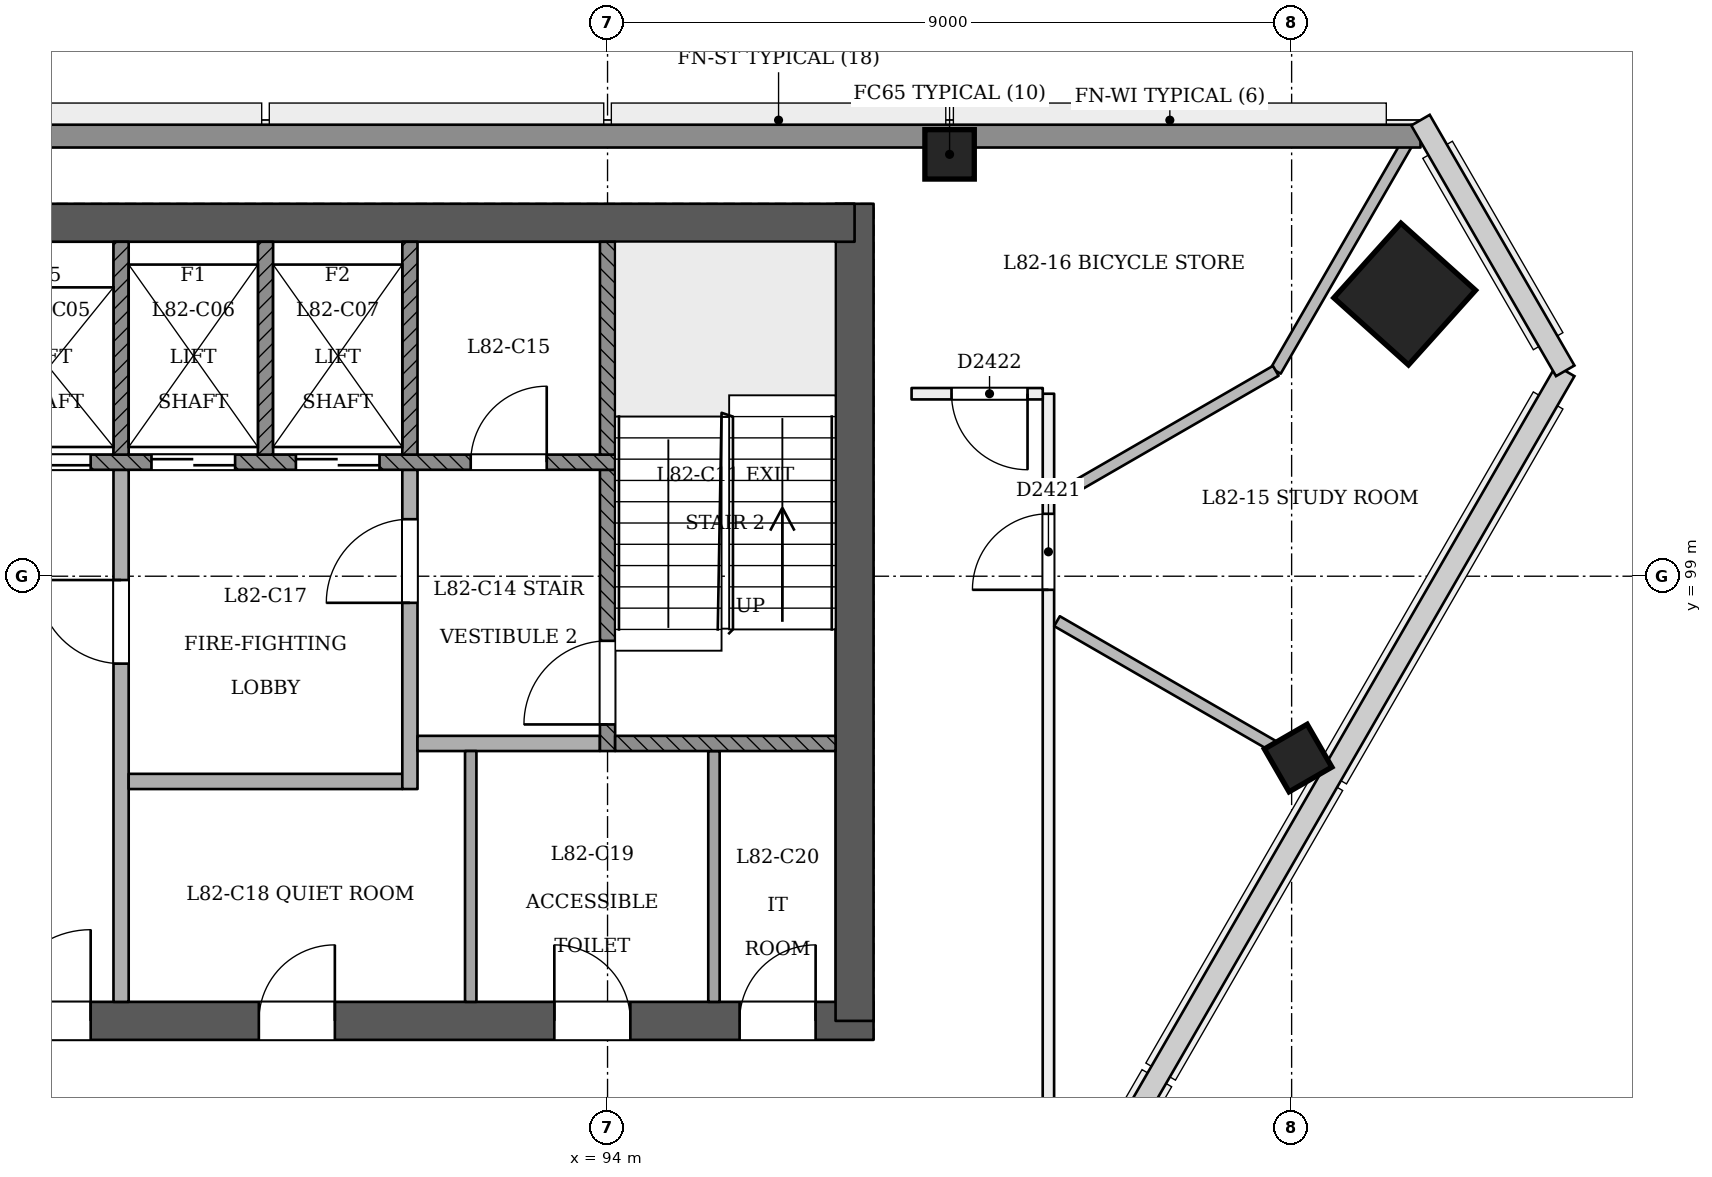
"""IFC4 building model, lengths in metres.
Left out: names, types, materials, properties, quantities, classifications, styles, units other than length and angle.
Written with IfcOpenShell. Run it as: python <this file> out.ifc"""

import sys

from ifc_helpers import new_model, si_unit, direction, frame, frame_2d, origin, origin_2d, place, context, subcontext, project, spatial, rectangle, extrude, element, fill, save


model = new_model("IFC4")
c1 = context("Model", 3, precision=1e-05, world=origin(), true_north=direction((0.0, 1.0)))
c2 = subcontext(c1, "Body", "Model", "MODEL_VIEW")
j1 = project(units=[si_unit("LENGTHUNIT", "METRE"), si_unit("PLANEANGLEUNIT", "RADIAN")], contexts=[c1])
p1 = place(None, origin())
s1 = spatial("IfcSite", under=j1, at=p1, CompositionType="ELEMENT")
p2 = place(p1, origin())
s2 = spatial("IfcBuilding", under=s1, at=p2, CompositionType="ELEMENT")
p3 = place(p2, frame((0.0, 0.0, 316.6)))
s3 = spatial("IfcBuildingStorey", under=s2, at=p3, CompositionType="ELEMENT", Elevation=316.6)
p4 = place(p3, frame((72.75, 93.15, 0.0), z_axis=(0.0, 0.0, 1.0), x_axis=(1.0, 0.0, 0.0)))
e1 = element("IfcWall", 1, at=p4, inside=s3, PredefinedType="SHEAR", context=c2, shape_type="SweptSolid", body=[
    extrude(rectangle(XDim=24.75, YDim=0.5, at=frame_2d((12.375, 0.0))), origin(), (0.0, 0.0, 1.0), 3.6),
])
p5 = place(p4, frame((1.05, 0.0, 0.0)))
e2 = element("IfcOpeningElement", 2, at=p5, cuts=e1, PredefinedType="OPENING", context=c2, shape_type="SweptSolid", body=[
    extrude(rectangle(XDim=1.2, YDim=2.1, at=frame_2d((0.6, 1.05))), frame((0.0, 0.26, 0.0), z_axis=(0.0, -1.0, 0.0), x_axis=(1.0, 0.0, 0.0)), (0.0, 0.0, 1.0), 0.521),
])
p6 = place(p4, frame((3.25, 0.0, 0.0)))
e3 = element("IfcOpeningElement", 3, at=p6, cuts=e1, PredefinedType="OPENING", context=c2, shape_type="SweptSolid", body=[
    extrude(rectangle(XDim=1.2, YDim=2.1, at=frame_2d((0.6, 1.05))), frame((0.0, 0.26, 0.0), z_axis=(0.0, -1.0, 0.0), x_axis=(1.0, 0.0, 0.0)), (0.0, 0.0, 1.0), 0.521),
])
p7 = place(p4, frame((13.25, 0.0, 0.0)))
e4 = element("IfcOpeningElement", 4, at=p7, cuts=e1, PredefinedType="OPENING", context=c2, shape_type="SweptSolid", body=[
    extrude(rectangle(XDim=1.2, YDim=2.1, at=frame_2d((0.6, 1.05))), frame((0.0, 0.26, 0.0), z_axis=(0.0, -1.0, 0.0), x_axis=(1.0, 0.0, 0.0)), (0.0, 0.0, 1.0), 0.521),
])
p8 = place(p4, frame((16.663, 0.0, 0.0)))
e5 = element("IfcOpeningElement", 5, at=p8, cuts=e1, PredefinedType="OPENING", context=c2, shape_type="SweptSolid", body=[
    extrude(rectangle(XDim=1.0, YDim=2.1, at=frame_2d((0.5, 1.05))), frame((0.0, 0.26, 0.0), z_axis=(0.0, -1.0, 0.0), x_axis=(1.0, 0.0, 0.0)), (0.0, 0.0, 1.0), 0.521),
])
p9 = place(p4, frame((20.55, 0.0, 0.0)))
e6 = element("IfcOpeningElement", 6, at=p9, cuts=e1, PredefinedType="OPENING", context=c2, shape_type="SweptSolid", body=[
    extrude(rectangle(XDim=1.0, YDim=2.1, at=frame_2d((0.5, 1.05))), frame((0.0, 0.26, 0.0), z_axis=(0.0, -1.0, 0.0), x_axis=(1.0, 0.0, 0.0)), (0.0, 0.0, 1.0), 0.521),
])
p10 = place(p4, frame((22.988, 0.0, 0.0)))
e7 = element("IfcOpeningElement", 7, at=p10, cuts=e1, PredefinedType="OPENING", context=c2, shape_type="SweptSolid", body=[
    extrude(rectangle(XDim=1.0, YDim=2.1, at=frame_2d((0.5, 1.05))), frame((0.0, 0.26, 0.0), z_axis=(0.0, -1.0, 0.0), x_axis=(1.0, 0.0, 0.0)), (0.0, 0.0, 1.0), 0.521),
])
p11 = place(p3, frame((97.25, 93.15, 0.0), z_axis=(0.0, 0.0, 1.0), x_axis=(0.0, 1.0, 0.0)))
e8 = element("IfcWall", 8, at=p11, inside=s3, PredefinedType="SHEAR", context=c2, shape_type="SweptSolid", body=[
    extrude(rectangle(XDim=10.75, YDim=0.5, at=frame_2d((5.375, 0.0))), origin(), (0.0, 0.0, 1.0), 3.6),
])
p12 = place(p3, frame((97.25, 103.65, 0.0), z_axis=(0.0, 0.0, 1.0), x_axis=(-1.0, 0.0, 0.0)))
e9 = element("IfcWall", 9, at=p12, inside=s3, PredefinedType="SHEAR", context=c2, shape_type="SweptSolid", body=[
    extrude(rectangle(XDim=24.75, YDim=0.5, at=frame_2d((12.375, 0.0))), origin(), (0.0, 0.0, 1.0), 3.6),
])
p13 = place(p3, frame((104.522, 102.701, 0.0), z_axis=(-0.028403721265, 0.009287135593, 0.999553389135), x_axis=(0.498888775048, -0.86638096488, 0.022226421766)))
e10 = element("IfcColumn", 10, at=p13, inside=s3, PredefinedType="COLUMN", context=c2, shape_type="SweptSolid", body=[
    extrude(rectangle(XDim=1.32, YDim=1.32, at=origin_2d()), origin(), (0.0, 0.0, 1.0), 3.602),
])
p14 = place(p3, frame((98.5, 104.55, 0.0), z_axis=(0.0, 0.0, 1.0), x_axis=(1.0, 0.0, 0.0)))
e11 = element("IfcColumn", 11, at=p14, inside=s3, PredefinedType="COLUMN", context=c2, shape_type="SweptSolid", body=[
    extrude(rectangle(XDim=0.65, YDim=0.65, at=origin_2d()), origin(), (0.0, 0.0, 1.0), 3.6),
])
p15 = place(p3, frame((103.113, 96.561, -0.02), z_axis=(-0.022222852987, 0.038483477124, 0.999012095419), x_axis=(-0.500174626395, -0.865639439229, 0.022219459073)))
e12 = element("IfcColumn", 12, at=p15, inside=s3, PredefinedType="COLUMN", context=c2, shape_type="SweptSolid", body=[
    extrude(rectangle(XDim=0.65, YDim=0.65, at=origin_2d()), origin(), (0.0, 0.0, 1.0), 3.604),
])
p16 = place(p3, frame((99.8, 91.742, 0.0), z_axis=(0.0, 0.0, 1.0), x_axis=(5.0553561e-05, 0.999999998722, 0.0)))
e13 = element("IfcWall", 13, at=p16, inside=s3, PredefinedType="PARTITIONING", context=c2, shape_type="SweptSolid", body=[
    extrude(rectangle(XDim=9.659, YDim=0.15, at=frame_2d((4.829, 0.0))), origin(), (0.0, 0.0, 1.0), 3.2),
])
p17 = place(p16, frame((7.079, 0.0, 0.0)))
e14 = element("IfcOpeningElement", 14, at=p17, cuts=e13, PredefinedType="OPENING", context=c2, shape_type="SweptSolid", body=[
    extrude(rectangle(XDim=1.0, YDim=2.1, at=frame_2d((0.5, 1.05))), frame((0.0, 0.085, 0.0), z_axis=(0.0, -1.0, 0.0), x_axis=(1.0, 0.0, 0.0)), (0.0, 0.0, 1.0), 0.171),
])
p18 = place(p3, frame((99.726, 101.401, 0.0), z_axis=(0.0, 0.0, 1.0), x_axis=(-1.0, 0.0, 0.0)))
e15 = element("IfcWall", 15, at=p18, inside=s3, PredefinedType="PARTITIONING", context=c2, shape_type="SweptSolid", body=[
    extrude(rectangle(XDim=1.726, YDim=0.15, at=frame_2d((0.863, 0.0))), origin(), (0.0, 0.0, 1.0), 3.2),
])
p19 = place(p18, frame((0.2, 0.0, 0.0)))
e16 = element("IfcOpeningElement", 16, at=p19, cuts=e15, PredefinedType="OPENING", context=c2, shape_type="SweptSolid", body=[
    extrude(rectangle(XDim=1.0, YDim=2.1, at=frame_2d((0.5, 1.05))), frame((0.0, 0.085, 0.0), z_axis=(0.0, -1.0, 0.0), x_axis=(1.0, 0.0, 0.0)), (0.0, 0.0, 1.0), 0.171),
])
p20 = place(p3, frame((103.415, 96.387, 0.0), z_axis=(0.0, 0.0, 1.0), x_axis=(-0.866042837784, 0.499969802211, 0.0)))
e17 = element("IfcWall", 17, at=p20, inside=s3, PredefinedType="PARTITIONING", context=c2, shape_type="SweptSolid", body=[
    extrude(rectangle(XDim=4.044, YDim=0.15, at=frame_2d((2.022, 0.0))), origin(), (0.0, 0.0, 1.0), 2.7),
])
p21 = place(p3, frame((104.638, 104.9, 0.0), z_axis=(0.0, 0.0, 1.0), x_axis=(-0.500014321241, -0.866017135254, 0.0)))
e18 = element("IfcWall", 18, at=p21, inside=s3, PredefinedType="PARTITIONING", context=c2, shape_type="SweptSolid", body=[
    extrude(rectangle(XDim=3.693, YDim=0.15, at=frame_2d((1.846, 0.0))), origin(), (0.0, 0.0, 1.0), 2.7),
])
p22 = place(p3, frame((102.791, 101.702, 0.0), z_axis=(0.0, 0.0, 1.0), x_axis=(-0.866037565146, -0.499978935311, 0.0)))
e19 = element("IfcWall", 19, at=p22, inside=s3, PredefinedType="PARTITIONING", context=c2, shape_type="SweptSolid", body=[
    extrude(rectangle(XDim=3.323, YDim=0.15, at=frame_2d((1.662, 0.0))), origin(), (0.0, 0.0, 1.0), 3.2),
])
p23 = place(p3, frame((65.304, 104.79, 0.0), z_axis=(0.0, 0.0, 1.0), x_axis=(1.0, 0.0, 0.0)))
e20 = element("IfcWall", 20, at=p23, inside=s3, PredefinedType="SOLIDWALL", context=c2, shape_type="SweptSolid", body=[
    extrude(rectangle(XDim=39.391, YDim=0.3, at=frame_2d((19.696, 0.0))), origin(), (0.0, 0.0, 1.0), 2.7),
])
p24 = place(p3, frame((87.6, 93.4, 0.0), z_axis=(0.0, 0.0, 1.0), x_axis=(0.0, 1.0, 0.0)))
e21 = element("IfcWall", 21, at=p24, inside=s3, PredefinedType="PARTITIONING", context=c2, shape_type="SweptSolid", body=[
    extrude(rectangle(XDim=7.0, YDim=0.2, at=frame_2d((3.5, 0.0))), origin(), (0.0, 0.0, 1.0), 3.2),
])
p25 = place(p24, frame((4.45, 0.0, 0.0)))
e22 = element("IfcOpeningElement", 22, at=p25, cuts=e21, PredefinedType="OPENING", context=c2, shape_type="SweptSolid", body=[
    extrude(rectangle(XDim=1.1, YDim=2.1, at=frame_2d((0.55, 1.05))), frame((0.0, 0.11, 0.0), z_axis=(0.0, -1.0, 0.0), x_axis=(1.0, 0.0, 0.0)), (0.0, 0.0, 1.0), 0.221),
])
for number, where, z_axis, x_axis in (
    (23, (92.2, 93.4, 0.0), (0.0, 0.0, 1.0), (0.0, 1.0, 0.0)),
    (24, (95.4, 93.4, 0.0), (0.0, 0.0, 1.0), (0.0, 1.0, 0.0)),
):
    element("IfcWall", number, at=place(p3, frame(where, z_axis=z_axis, x_axis=x_axis)), inside=s3, PredefinedType="PARTITIONING", context=c2, shape_type="SweptSolid", body=[
        extrude(rectangle(XDim=3.3, YDim=0.15, at=frame_2d((1.65, 0.0))), origin(), (0.0, 0.0, 1.0), 3.2),
    ])
p26 = place(p3, frame((87.7, 96.3, 0.0), z_axis=(0.0, 0.0, 1.0), x_axis=(1.0, 0.0, 0.0)))
e25 = element("IfcWall", 25, at=p26, inside=s3, PredefinedType="PARTITIONING", context=c2, shape_type="SweptSolid", body=[
    extrude(rectangle(XDim=3.6, YDim=0.2, at=frame_2d((1.8, 0.0))), origin(), (0.0, 0.0, 1.0), 3.2),
])
p27 = place(p3, frame((91.4, 96.2, 0.0), z_axis=(0.0, 0.0, 1.0), x_axis=(0.0, 1.0, 0.0)))
e26 = element("IfcWall", 26, at=p27, inside=s3, PredefinedType="PARTITIONING", context=c2, shape_type="SweptSolid", body=[
    extrude(rectangle(XDim=4.2, YDim=0.2, at=frame_2d((2.1, 0.0))), origin(), (0.0, 0.0, 1.0), 3.2),
])
p28 = place(p27, frame((2.45, 0.0, 0.0)))
e27 = element("IfcOpeningElement", 27, at=p28, cuts=e26, PredefinedType="OPENING", context=c2, shape_type="SweptSolid", body=[
    extrude(rectangle(XDim=1.1, YDim=2.1, at=frame_2d((0.55, 1.05))), frame((0.0, 0.11, 0.0), z_axis=(0.0, -1.0, 0.0), x_axis=(1.0, 0.0, 0.0)), (0.0, 0.0, 1.0), 0.221),
])
p29 = place(p3, frame((91.5, 96.8, 0.0), z_axis=(0.0, 0.0, 1.0), x_axis=(1.0, 0.0, 0.0)))
e28 = element("IfcWall", 28, at=p29, inside=s3, PredefinedType="PARTITIONING", context=c2, shape_type="SweptSolid", body=[
    extrude(rectangle(XDim=2.4, YDim=0.2, at=frame_2d((1.2, 0.0))), origin(), (0.0, 0.0, 1.0), 3.2),
])
p30 = place(p3, frame((94.0, 96.7, 0.0), z_axis=(0.0, 0.0, 1.0), x_axis=(0.0, 1.0, 0.0)))
e29 = element("IfcWall", 29, at=p30, inside=s3, PredefinedType="SOLIDWALL", context=c2, shape_type="SweptSolid", body=[
    extrude(rectangle(XDim=3.7, YDim=0.2, at=frame_2d((1.85, 0.0))), origin(), (0.0, 0.0, 1.0), 3.2),
])
p31 = place(p30, frame((0.35, 0.0, 0.0)))
e30 = element("IfcOpeningElement", 30, at=p31, cuts=e29, PredefinedType="OPENING", context=c2, shape_type="SweptSolid", body=[
    extrude(rectangle(XDim=1.1, YDim=2.1, at=frame_2d((0.55, 1.05))), frame((0.0, 0.11, 0.0), z_axis=(0.0, -1.0, 0.0), x_axis=(1.0, 0.0, 0.0)), (0.0, 0.0, 1.0), 0.221),
])
p32 = place(p3, frame((94.1, 96.8, 0.0), z_axis=(0.0, 0.0, 1.0), x_axis=(1.0, 0.0, 0.0)))
e31 = element("IfcWall", 31, at=p32, inside=s3, PredefinedType="SOLIDWALL", context=c2, shape_type="SweptSolid", body=[
    extrude(rectangle(XDim=2.9, YDim=0.2, at=frame_2d((1.45, 0.0))), origin(), (0.0, 0.0, 1.0), 3.2),
])
p33 = place(p3, frame((75.9, 100.5, 0.0), z_axis=(0.0, 0.0, 1.0), x_axis=(1.0, 0.0, 0.0)))
e32 = element("IfcWall", 32, at=p33, inside=s3, PredefinedType="SOLIDWALL", context=c2, shape_type="SweptSolid", body=[
    extrude(rectangle(XDim=18.2, YDim=0.2, at=frame_2d((9.1, 0.0))), origin(), (0.0, 0.0, 1.0), 3.2),
])
p34 = place(p33, frame((2.6, 0.0, 0.0)))
e33 = element("IfcOpeningElement", 33, at=p34, cuts=e32, PredefinedType="OPENING", context=c2, shape_type="SweptSolid", body=[
    extrude(rectangle(XDim=1.1, YDim=2.1, at=frame_2d((0.55, 1.05))), frame((0.0, 0.11, 0.0), z_axis=(0.0, -1.0, 0.0), x_axis=(1.0, 0.0, 0.0)), (0.0, 0.0, 1.0), 0.221),
])
p35 = place(p33, frame((4.5, 0.0, 0.0)))
e34 = element("IfcOpeningElement", 34, at=p35, cuts=e32, PredefinedType="OPENING", context=c2, shape_type="SweptSolid", body=[
    extrude(rectangle(XDim=1.1, YDim=2.1, at=frame_2d((0.55, 1.05))), frame((0.0, 0.11, 0.0), z_axis=(0.0, -1.0, 0.0), x_axis=(1.0, 0.0, 0.0)), (0.0, 0.0, 1.0), 0.221),
])
p36 = place(p33, frame((6.4, 0.0, 0.0)))
e35 = element("IfcOpeningElement", 35, at=p36, cuts=e32, PredefinedType="OPENING", context=c2, shape_type="SweptSolid", body=[
    extrude(rectangle(XDim=1.1, YDim=2.1, at=frame_2d((0.55, 1.05))), frame((0.0, 0.11, 0.0), z_axis=(0.0, -1.0, 0.0), x_axis=(1.0, 0.0, 0.0)), (0.0, 0.0, 1.0), 0.221),
])
p37 = place(p33, frame((8.3, 0.0, 0.0)))
e36 = element("IfcOpeningElement", 36, at=p37, cuts=e32, PredefinedType="OPENING", context=c2, shape_type="SweptSolid", body=[
    extrude(rectangle(XDim=1.1, YDim=2.1, at=frame_2d((0.55, 1.05))), frame((0.0, 0.11, 0.0), z_axis=(0.0, -1.0, 0.0), x_axis=(1.0, 0.0, 0.0)), (0.0, 0.0, 1.0), 0.221),
])
p38 = place(p33, frame((10.2, 0.0, 0.0)))
e37 = element("IfcOpeningElement", 37, at=p38, cuts=e32, PredefinedType="OPENING", context=c2, shape_type="SweptSolid", body=[
    extrude(rectangle(XDim=1.1, YDim=2.1, at=frame_2d((0.55, 1.05))), frame((0.0, 0.11, 0.0), z_axis=(0.0, -1.0, 0.0), x_axis=(1.0, 0.0, 0.0)), (0.0, 0.0, 1.0), 0.221),
])
p39 = place(p33, frame((12.1, 0.0, 0.0)))
e38 = element("IfcOpeningElement", 38, at=p39, cuts=e32, PredefinedType="OPENING", context=c2, shape_type="SweptSolid", body=[
    extrude(rectangle(XDim=1.1, YDim=2.1, at=frame_2d((0.55, 1.05))), frame((0.0, 0.11, 0.0), z_axis=(0.0, -1.0, 0.0), x_axis=(1.0, 0.0, 0.0)), (0.0, 0.0, 1.0), 0.221),
])
p40 = place(p33, frame((14.0, 0.0, 0.0)))
e39 = element("IfcOpeningElement", 39, at=p40, cuts=e32, PredefinedType="OPENING", context=c2, shape_type="SweptSolid", body=[
    extrude(rectangle(XDim=1.1, YDim=2.1, at=frame_2d((0.55, 1.05))), frame((0.0, 0.11, 0.0), z_axis=(0.0, -1.0, 0.0), x_axis=(1.0, 0.0, 0.0)), (0.0, 0.0, 1.0), 0.221),
])
p41 = place(p33, frame((0.65, 0.0, 0.0)))
e40 = element("IfcOpeningElement", 40, at=p41, cuts=e32, PredefinedType="OPENING", context=c2, shape_type="SweptSolid", body=[
    extrude(rectangle(XDim=1.0, YDim=2.1, at=frame_2d((0.5, 1.05))), frame((0.0, 0.11, 0.0), z_axis=(0.0, -1.0, 0.0), x_axis=(1.0, 0.0, 0.0)), (0.0, 0.0, 1.0), 0.221),
])
p42 = place(p33, frame((16.3, 0.0, 0.0)))
e41 = element("IfcOpeningElement", 41, at=p42, cuts=e32, PredefinedType="OPENING", context=c2, shape_type="SweptSolid", body=[
    extrude(rectangle(XDim=1.0, YDim=2.1, at=frame_2d((0.5, 1.05))), frame((0.0, 0.11, 0.0), z_axis=(0.0, -1.0, 0.0), x_axis=(1.0, 0.0, 0.0)), (0.0, 0.0, 1.0), 0.221),
])
for number, where, z_axis, x_axis in (
    (42, (87.6, 100.6, 0.0), (0.0, 0.0, 1.0), (0.0, 1.0, 0.0)),
    (43, (89.5, 100.6, 0.0), (0.0, 0.0, 1.0), (0.0, 1.0, 0.0)),
    (44, (91.4, 100.6, 0.0), (0.0, 0.0, 1.0), (0.0, 1.0, 0.0)),
    (45, (94.0, 100.6, 0.0), (0.0, 0.0, 1.0), (0.0, 1.0, 0.0)),
):
    element("IfcWall", number, at=place(p3, frame(where, z_axis=z_axis, x_axis=x_axis)), inside=s3, PredefinedType="SOLIDWALL", context=c2, shape_type="SweptSolid", body=[
        extrude(rectangle(XDim=2.8, YDim=0.2, at=frame_2d((1.4, 0.0))), origin(), (0.0, 0.0, 1.0), 3.2),
    ])
p43 = place(p17, origin())
e46 = element("IfcDoor", 46, at=p43, inside=s3, OperationType="SINGLE_SWING_LEFT", PredefinedType="NOTDEFINED", context=c2, shape_type="SweptSolid", body=[
    extrude(rectangle(XDim=1.0, YDim=2.1, at=frame_2d((0.5, 1.05))), frame((0.0, 0.025, 0.0), z_axis=(0.0, -1.0, 0.0), x_axis=(1.0, 0.0, 0.0)), (0.0, 0.0, 1.0), 0.05),
])
fill(e14, e46)
p44 = place(p19, origin())
e47 = element("IfcDoor", 47, at=p44, inside=s3, OperationType="SINGLE_SWING_LEFT", PredefinedType="NOTDEFINED", context=c2, shape_type="SweptSolid", body=[
    extrude(rectangle(XDim=1.0, YDim=2.1, at=frame_2d((0.5, 1.05))), frame((0.0, 0.025, 0.0), z_axis=(0.0, -1.0, 0.0), x_axis=(1.0, 0.0, 0.0)), (0.0, 0.0, 1.0), 0.05),
])
fill(e16, e47)
p45 = place(p38, origin())
e48 = element("IfcDoor", 48, at=p45, inside=s3, OperationType="SLIDING_TO_RIGHT", PredefinedType="NOTDEFINED", context=c2, shape_type="SweptSolid", body=[
    extrude(rectangle(XDim=1.1, YDim=2.1, at=frame_2d((0.55, 1.05))), frame((0.0, 0.025, 0.0), z_axis=(0.0, -1.0, 0.0), x_axis=(1.0, 0.0, 0.0)), (0.0, 0.0, 1.0), 0.05),
])
fill(e37, e48)
p46 = place(p39, origin())
e49 = element("IfcDoor", 49, at=p46, inside=s3, OperationType="SLIDING_TO_RIGHT", PredefinedType="NOTDEFINED", context=c2, shape_type="SweptSolid", body=[
    extrude(rectangle(XDim=1.1, YDim=2.1, at=frame_2d((0.55, 1.05))), frame((0.0, 0.025, 0.0), z_axis=(0.0, -1.0, 0.0), x_axis=(1.0, 0.0, 0.0)), (0.0, 0.0, 1.0), 0.05),
])
fill(e38, e49)
p47 = place(p40, origin())
e50 = element("IfcDoor", 50, at=p47, inside=s3, OperationType="SLIDING_TO_LEFT", PredefinedType="NOTDEFINED", context=c2, shape_type="SweptSolid", body=[
    extrude(rectangle(XDim=1.1, YDim=2.1, at=frame_2d((0.55, 1.05))), frame((0.0, 0.025, 0.0), z_axis=(0.0, -1.0, 0.0), x_axis=(1.0, 0.0, 0.0)), (0.0, 0.0, 1.0), 0.05),
])
fill(e39, e50)
p48 = place(p31, origin())
e51 = element("IfcDoor", 51, at=p48, inside=s3, OperationType="SINGLE_SWING_LEFT", PredefinedType="NOTDEFINED", context=c2, shape_type="SweptSolid", body=[
    extrude(rectangle(XDim=1.1, YDim=2.1, at=frame_2d((0.55, 1.05))), frame((0.0, 0.025, 0.0), z_axis=(0.0, -1.0, 0.0), x_axis=(1.0, 0.0, 0.0)), (0.0, 0.0, 1.0), 0.05),
])
fill(e30, e51)
p49 = place(p25, origin())
e52 = element("IfcDoor", 52, at=p49, inside=s3, OperationType="SINGLE_SWING_RIGHT", PredefinedType="NOTDEFINED", context=c2, shape_type="SweptSolid", body=[
    extrude(rectangle(XDim=1.1, YDim=2.1, at=frame_2d((0.55, 1.05))), frame((0.0, 0.025, 0.0), z_axis=(0.0, -1.0, 0.0), x_axis=(1.0, 0.0, 0.0)), (0.0, 0.0, 1.0), 0.05),
])
fill(e22, e52)
p50 = place(p28, origin())
e53 = element("IfcDoor", 53, at=p50, inside=s3, OperationType="SINGLE_SWING_LEFT", PredefinedType="NOTDEFINED", context=c2, shape_type="SweptSolid", body=[
    extrude(rectangle(XDim=1.1, YDim=2.1, at=frame_2d((0.55, 1.05))), frame((0.0, 0.025, 0.0), z_axis=(0.0, -1.0, 0.0), x_axis=(1.0, 0.0, 0.0)), (0.0, 0.0, 1.0), 0.05),
])
fill(e27, e53)
p51 = place(p7, origin())
e54 = element("IfcDoor", 54, at=p51, inside=s3, OperationType="SINGLE_SWING_RIGHT", PredefinedType="NOTDEFINED", context=c2, shape_type="SweptSolid", body=[
    extrude(rectangle(XDim=1.2, YDim=2.1, at=frame_2d((0.6, 1.05))), frame((0.0, 0.025, 0.0), z_axis=(0.0, -1.0, 0.0), x_axis=(1.0, 0.0, 0.0)), (0.0, 0.0, 1.0), 0.05),
])
fill(e4, e54)
p52 = place(p42, origin())
e55 = element("IfcDoor", 55, at=p52, inside=s3, OperationType="SINGLE_SWING_RIGHT", PredefinedType="NOTDEFINED", context=c2, shape_type="SweptSolid", body=[
    extrude(rectangle(XDim=1.0, YDim=2.1, at=frame_2d((0.5, 1.05))), frame((0.0, 0.025, 0.0), z_axis=(0.0, -1.0, 0.0), x_axis=(1.0, 0.0, 0.0)), (0.0, 0.0, 1.0), 0.05),
])
fill(e41, e55)
p53 = place(p8, origin())
e56 = element("IfcDoor", 56, at=p53, inside=s3, OperationType="SINGLE_SWING_RIGHT", PredefinedType="NOTDEFINED", context=c2, shape_type="SweptSolid", body=[
    extrude(rectangle(XDim=1.0, YDim=2.1, at=frame_2d((0.5, 1.05))), frame((0.0, 0.025, 0.0), z_axis=(0.0, -1.0, 0.0), x_axis=(1.0, 0.0, 0.0)), (0.0, 0.0, 1.0), 0.05),
])
fill(e5, e56)
p54 = place(p9, origin())
e57 = element("IfcDoor", 57, at=p54, inside=s3, OperationType="SINGLE_SWING_LEFT", PredefinedType="NOTDEFINED", context=c2, shape_type="SweptSolid", body=[
    extrude(rectangle(XDim=1.0, YDim=2.1, at=frame_2d((0.5, 1.05))), frame((0.0, 0.025, 0.0), z_axis=(0.0, -1.0, 0.0), x_axis=(1.0, 0.0, 0.0)), (0.0, 0.0, 1.0), 0.05),
])
fill(e6, e57)
p55 = place(p10, origin())
e58 = element("IfcDoor", 58, at=p55, inside=s3, OperationType="SINGLE_SWING_RIGHT", PredefinedType="NOTDEFINED", context=c2, shape_type="SweptSolid", body=[
    extrude(rectangle(XDim=1.0, YDim=2.1, at=frame_2d((0.5, 1.05))), frame((0.0, 0.025, 0.0), z_axis=(0.0, -1.0, 0.0), x_axis=(1.0, 0.0, 0.0)), (0.0, 0.0, 1.0), 0.05),
])
fill(e7, e58)
save(model, sys.argv[1])
